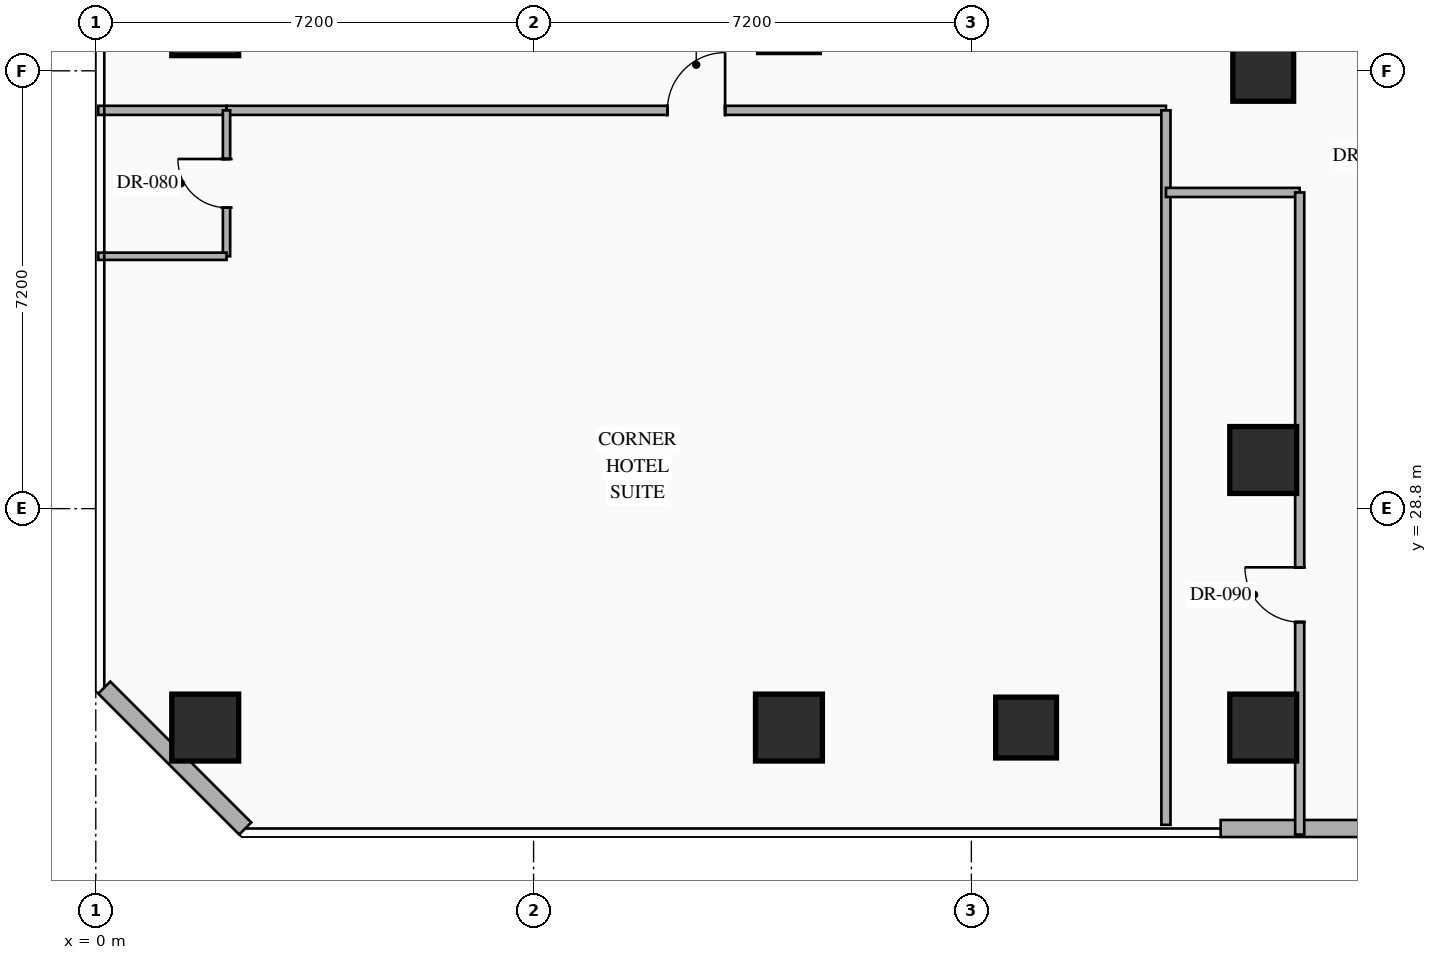
"""IFC4 building model, lengths in metres.
Left out: names, types, materials, properties, quantities, classifications, styles, units other than length and angle.
Written with IfcOpenShell. Run it as: python <this file> out.ifc"""

import sys

from ifc_helpers import new_model, si_unit, direction, frame, frame_2d, origin, origin_2d, place, context, subcontext, project, spatial, rectangle, hollow_rectangle, extrude, element, fill, save


model = new_model("IFC4")
c1 = context("Model", 3, precision=1e-05, world=origin(), true_north=direction((0.0, 1.0)))
c2 = subcontext(c1, "Body", "Model", "MODEL_VIEW")
j1 = project(units=[si_unit("LENGTHUNIT", "METRE"), si_unit("PLANEANGLEUNIT", "RADIAN")], contexts=[c1])
p1 = place(None, origin())
s1 = spatial("IfcSite", under=j1, at=p1, CompositionType="ELEMENT")
p2 = place(p1, origin())
s2 = spatial("IfcBuilding", under=s1, at=p2, CompositionType="ELEMENT")
p3 = place(p2, frame((0.0, 0.0, 43.3)))
s3 = spatial("IfcBuildingStorey", under=s2, at=p3, CompositionType="ELEMENT", Elevation=43.3)
for number, where, z_axis, x_axis in (
    (1, (1.8, 25.2, 0.0), (0.0, 0.0, 1.0), (1.0, 0.0, 0.0)),
    (2, (1.8, 36.8, 0.0), (0.0, 0.0, 1.0), (1.0, 0.0, 0.0)),
    (3, (11.4, 25.2, 0.0), (0.0, 0.0, 1.0), (1.0, 0.0, 0.0)),
    (4, (19.2, 25.2, 0.0), (0.0, 0.0, 1.0), (1.0, 0.0, 0.0)),
    (5, (19.2, 29.6, 0.0), (0.0, 0.0, 1.0), (1.0, 0.0, 0.0)),
):
    element("IfcColumn", number, at=place(p3, frame(where, z_axis=z_axis, x_axis=x_axis)), inside=s3, PredefinedType="COLUMN", context=c2, shape_type="SweptSolid", body=[
        extrude(hollow_rectangle(XDim=1.1, YDim=1.1, WallThickness=0.04, at=origin_2d()), origin(), (0.0, 0.0, 1.0), 3.35),
    ])
for number, where, z_axis, x_axis in (
    (6, (19.2, 36.0, 0.0), (0.0, 0.0, 1.0), (1.0, 0.0, 0.0)),
    (7, (15.3, 25.2, 0.0), (0.0, 0.0, 1.0), (1.0, 0.0, 0.0)),
):
    element("IfcColumn", number, at=place(p3, frame(where, z_axis=z_axis, x_axis=x_axis)), inside=s3, PredefinedType="COLUMN", context=c2, shape_type="SweptSolid", body=[
        extrude(hollow_rectangle(XDim=1.0, YDim=1.0, WallThickness=0.038, at=origin_2d()), origin(), (0.0, 0.0, 1.0), 3.35),
    ])
p4 = place(p3, frame((25.247, 23.54, 0.0), z_axis=(0.0, 0.0, 1.0), x_axis=(-1.0, 0.0, 0.0)))
e8 = element("IfcWall", 8, at=p4, inside=s3, PredefinedType="STANDARD", context=c2, shape_type="SweptSolid", body=[
    extrude(rectangle(XDim=6.747, YDim=0.28, at=frame_2d((3.374, 0.0))), origin(), (0.0, 0.0, 1.0), 3.13),
])
p5 = place(p3, frame((2.458, 23.54, 0.0), z_axis=(0.0, 0.0, 1.0), x_axis=(-0.707144017911, 0.707069542501, 0.0)))
e9 = element("IfcWall", 9, at=p5, inside=s3, PredefinedType="STANDARD", context=c2, shape_type="SweptSolid", body=[
    extrude(rectangle(XDim=3.278, YDim=0.28, at=frame_2d((1.639, 0.0))), origin(), (0.0, 0.0, 1.0), 3.13),
])
p6 = place(p3, frame((0.04, 35.35, 0.0), z_axis=(0.0, 0.0, 1.0), x_axis=(1.0, 0.0, 0.0)))
e10 = element("IfcWall", 10, at=p6, inside=s3, PredefinedType="PARTITIONING", context=c2, shape_type="SweptSolid", body=[
    extrude(rectangle(XDim=2.11, YDim=0.15, at=frame_2d((1.055, 0.0))), origin(), (0.0, 0.0, 1.0), 3.13),
])
p7 = place(p3, frame((2.15, 35.35, 0.0), z_axis=(0.0, 0.0, 1.0), x_axis=(1.0, 0.0, 0.0)))
e11 = element("IfcWall", 11, at=p7, inside=s3, PredefinedType="PARTITIONING", context=c2, shape_type="SweptSolid", body=[
    extrude(rectangle(XDim=15.45, YDim=0.15, at=frame_2d((7.725, 0.0))), origin(), (0.0, 0.0, 1.0), 3.13),
])
p8 = place(p7, frame((7.25, 0.0, 0.0)))
e12 = element("IfcOpeningElement", 12, at=p8, cuts=e11, PredefinedType="OPENING", context=c2, shape_type="SweptSolid", body=[
    extrude(rectangle(XDim=0.95, YDim=2.15, at=frame_2d((0.475, 1.075))), frame((0.0, 0.085, 0.0), z_axis=(0.0, -1.0, 0.0), x_axis=(1.0, 0.0, 0.0)), (0.0, 0.0, 1.0), 0.17),
])
p9 = place(p3, frame((2.15, 32.95, 0.0), z_axis=(0.0, 0.0, 1.0), x_axis=(0.0, 1.0, 0.0)))
e13 = element("IfcWall", 13, at=p9, inside=s3, PredefinedType="PARTITIONING", context=c2, shape_type="SweptSolid", body=[
    extrude(rectangle(XDim=2.4, YDim=0.12, at=frame_2d((1.2, 0.0))), origin(), (0.0, 0.0, 1.0), 3.13),
])
p10 = place(p9, frame((0.8, 0.0, 0.0)))
e14 = element("IfcOpeningElement", 14, at=p10, cuts=e13, PredefinedType="OPENING", context=c2, shape_type="SweptSolid", body=[
    extrude(rectangle(XDim=0.8, YDim=2.06, at=frame_2d((0.4, 1.03))), frame((0.0, 0.07, 0.0), z_axis=(0.0, -1.0, 0.0), x_axis=(1.0, 0.0, 0.0)), (0.0, 0.0, 1.0), 0.14),
])
p11 = place(p3, frame((0.04, 32.95, 0.0), z_axis=(0.0, 0.0, 1.0), x_axis=(1.0, 0.0, 0.0)))
e15 = element("IfcWall", 15, at=p11, inside=s3, PredefinedType="PARTITIONING", context=c2, shape_type="SweptSolid", body=[
    extrude(rectangle(XDim=2.11, YDim=0.12, at=frame_2d((1.055, 0.0))), origin(), (0.0, 0.0, 1.0), 3.13),
])
p12 = place(p3, frame((17.6, 23.6, 0.0), z_axis=(0.0, 0.0, 1.0), x_axis=(0.0, 1.0, 0.0)))
e16 = element("IfcWall", 16, at=p12, inside=s3, PredefinedType="PARTITIONING", context=c2, shape_type="SweptSolid", body=[
    extrude(rectangle(XDim=11.75, YDim=0.15, at=frame_2d((5.875, 0.0))), origin(), (0.0, 0.0, 1.0), 3.13),
])
p13 = place(p3, frame((17.6, 34.0, 0.0), z_axis=(0.0, 0.0, 1.0), x_axis=(1.0, 0.0, 0.0)))
e17 = element("IfcWall", 17, at=p13, inside=s3, PredefinedType="PARTITIONING", context=c2, shape_type="SweptSolid", body=[
    extrude(rectangle(XDim=2.2, YDim=0.15, at=frame_2d((1.1, 0.0))), origin(), (0.0, 0.0, 1.0), 3.13),
])
p14 = place(p3, frame((19.8, 23.44, 0.0), z_axis=(0.0, 0.0, 1.0), x_axis=(0.0, 1.0, 0.0)))
e18 = element("IfcWall", 18, at=p14, inside=s3, PredefinedType="PARTITIONING", context=c2, shape_type="SweptSolid", body=[
    extrude(rectangle(XDim=10.56, YDim=0.15, at=frame_2d((5.28, 0.0))), origin(), (0.0, 0.0, 1.0), 3.13),
])
p15 = place(p14, frame((3.495, 0.0, 0.0)))
e19 = element("IfcOpeningElement", 19, at=p15, cuts=e18, PredefinedType="OPENING", context=c2, shape_type="SweptSolid", body=[
    extrude(rectangle(XDim=0.9, YDim=2.15, at=frame_2d((0.45, 1.075))), frame((0.0, 0.085, 0.0), z_axis=(0.0, -1.0, 0.0), x_axis=(1.0, 0.0, 0.0)), (0.0, 0.0, 1.0), 0.17),
])
p16 = place(p8, origin())
e20 = element("IfcDoor", 20, at=p16, inside=s3, OperationType="SINGLE_SWING_RIGHT", PredefinedType="DOOR", context=c2, shape_type="SweptSolid", body=[
    extrude(rectangle(XDim=0.95, YDim=2.15, at=frame_2d((0.475, 1.075))), frame((0.0, 0.025, 0.0), z_axis=(0.0, -1.0, 0.0), x_axis=(1.0, 0.0, 0.0)), (0.0, 0.0, 1.0), 0.05),
])
fill(e12, e20)
p17 = place(p10, origin())
e21 = element("IfcDoor", 21, at=p17, inside=s3, OperationType="SINGLE_SWING_RIGHT", PredefinedType="DOOR", context=c2, shape_type="SweptSolid", body=[
    extrude(rectangle(XDim=0.8, YDim=2.06, at=frame_2d((0.4, 1.03))), frame((0.0, 0.025, 0.0), z_axis=(0.0, -1.0, 0.0), x_axis=(1.0, 0.0, 0.0)), (0.0, 0.0, 1.0), 0.05),
])
fill(e14, e21)
p18 = place(p15, origin())
e22 = element("IfcDoor", 22, at=p18, inside=s3, OperationType="SINGLE_SWING_RIGHT", PredefinedType="DOOR", context=c2, shape_type="SweptSolid", body=[
    extrude(rectangle(XDim=0.9, YDim=2.15, at=frame_2d((0.45, 1.075))), frame((0.0, 0.025, 0.0), z_axis=(0.0, -1.0, 0.0), x_axis=(1.0, 0.0, 0.0)), (0.0, 0.0, 1.0), 0.05),
])
fill(e19, e22)
save(model, sys.argv[1])
